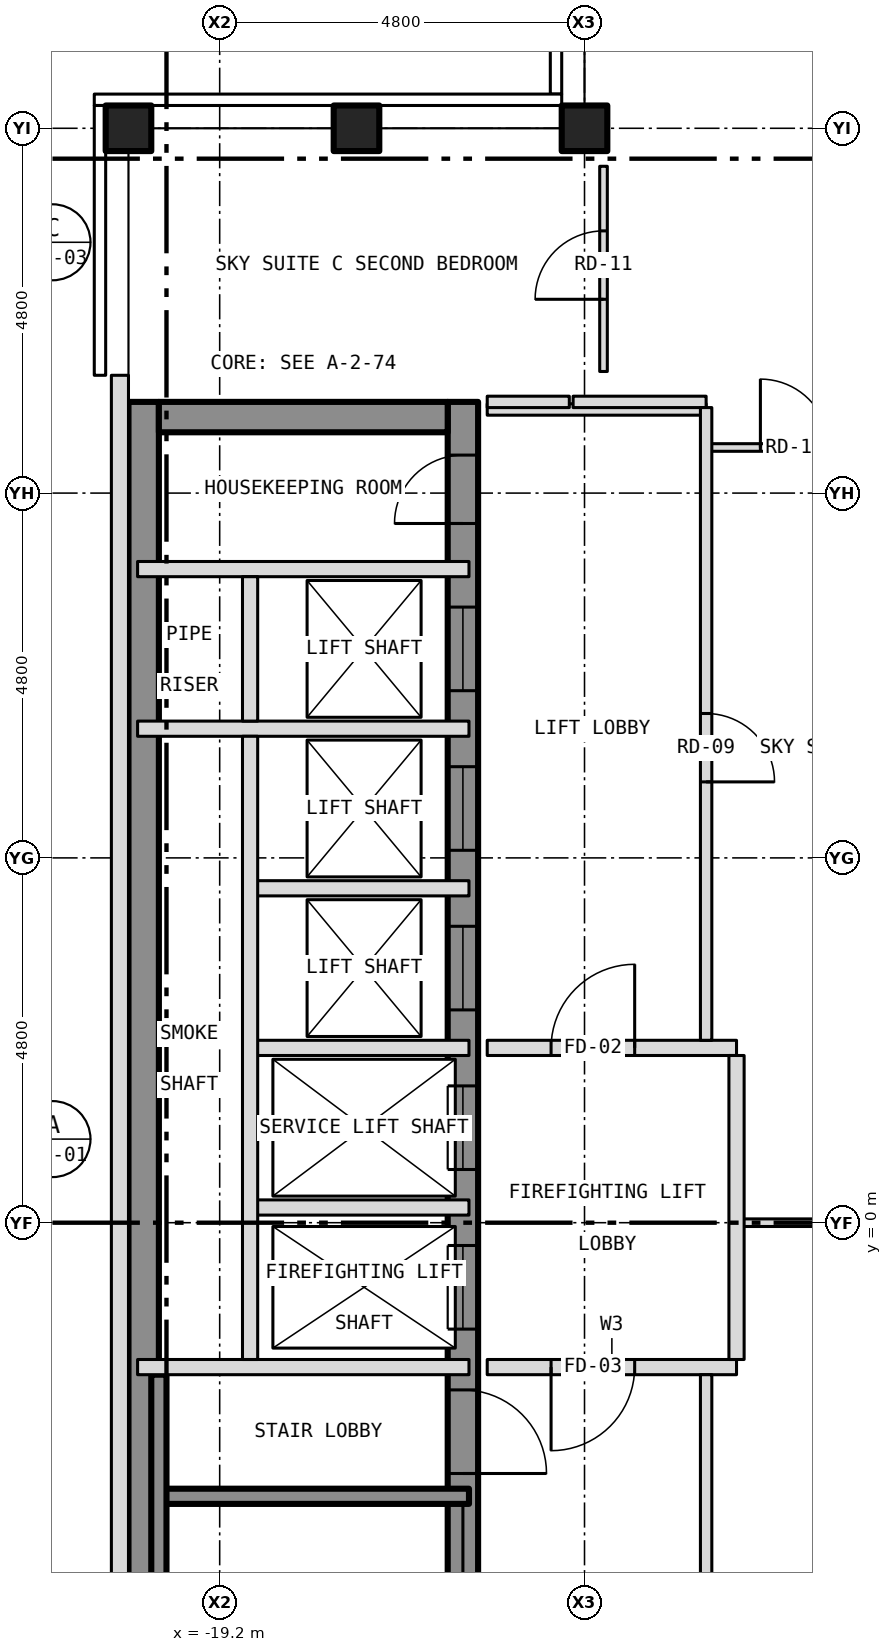
"""IFC4 building model, lengths in metres.
Left out: names, types, materials, properties, quantities, classifications, styles, units other than length and angle.
Written with IfcOpenShell. Run it as: python <this file> out.ifc"""

import sys

from ifc_helpers import new_model, si_unit, direction, frame, frame_2d, origin, origin_2d, place, context, subcontext, project, spatial, rectangle, hollow_rectangle, extrude, element, fill, save


model = new_model("IFC4")
c1 = context("Model", 3, precision=1e-05, world=origin(), true_north=direction((0.0, 1.0)))
c2 = subcontext(c1, "Body", "Model", "MODEL_VIEW")
j1 = project(units=[si_unit("LENGTHUNIT", "METRE"), si_unit("PLANEANGLEUNIT", "RADIAN")], contexts=[c1])
p1 = place(None, origin())
s1 = spatial("IfcSite", under=j1, at=p1, CompositionType="ELEMENT")
p2 = place(p1, origin())
s2 = spatial("IfcBuilding", under=s1, at=p2, CompositionType="ELEMENT")
p3 = place(p2, frame((0.0, 0.0, 269.0)))
s3 = spatial("IfcBuildingStorey", under=s2, at=p3, CompositionType="ELEMENT", Elevation=269.0)
for number, where, z_axis, x_axis in (
    (1, (-20.4, 14.4, -0.15), (0.0, 0.0, 1.0), (1.0, 0.0, 0.0)),
    (2, (-14.4, 14.4, -0.15), (0.0, 0.0, 1.0), (1.0, 0.0, 0.0)),
    (3, (-17.4, 14.4, -0.15), (0.0, 0.0, 1.0), (1.0, 0.0, 0.0)),
):
    element("IfcColumn", number, at=place(p3, frame(where, z_axis=z_axis, x_axis=x_axis)), inside=s3, PredefinedType="COLUMN", context=c2, shape_type="SweptSolid", body=[
        extrude(hollow_rectangle(XDim=0.6, YDim=0.6, WallThickness=0.03, at=origin_2d()), origin(), (0.0, 0.0, 1.0), 3.5),
    ])
p4 = place(p3, frame((-16.0, -10.8, 0.0), z_axis=(0.0, 0.0, 1.0), x_axis=(0.0, 1.0, 0.0)))
e4 = element("IfcWall", 4, at=p4, inside=s3, PredefinedType="SHEAR", context=c2, shape_type="SweptSolid", body=[
    extrude(rectangle(XDim=21.6, YDim=0.4, at=frame_2d((10.8, 0.0))), origin(), (0.0, 0.0, 1.0), 3.25),
])
p5 = place(p4, frame((9.4, 0.0, 0.0)))
e5 = element("IfcOpeningElement", 5, at=p5, cuts=e4, PredefinedType="OPENING", context=c2, shape_type="SweptSolid", body=[
    extrude(rectangle(XDim=1.1, YDim=2.1, at=frame_2d((0.55, 1.05))), frame((0.0, 0.212, 0.0), z_axis=(0.0, -1.0, 0.0), x_axis=(1.0, 0.0, 0.0)), (0.0, 0.0, 1.0), 0.424),
])
p6 = place(p4, frame((11.5, 0.0, 0.0)))
e6 = element("IfcOpeningElement", 6, at=p6, cuts=e4, PredefinedType="OPENING", context=c2, shape_type="SweptSolid", body=[
    extrude(rectangle(XDim=1.1, YDim=2.1, at=frame_2d((0.55, 1.05))), frame((0.0, 0.212, 0.0), z_axis=(0.0, -1.0, 0.0), x_axis=(1.0, 0.0, 0.0)), (0.0, 0.0, 1.0), 0.424),
])
p7 = place(p4, frame((13.6, 0.0, 0.0)))
e7 = element("IfcOpeningElement", 7, at=p7, cuts=e4, PredefinedType="OPENING", context=c2, shape_type="SweptSolid", body=[
    extrude(rectangle(XDim=1.1, YDim=2.1, at=frame_2d((0.55, 1.05))), frame((0.0, 0.212, 0.0), z_axis=(0.0, -1.0, 0.0), x_axis=(1.0, 0.0, 0.0)), (0.0, 0.0, 1.0), 0.424),
])
p8 = place(p4, frame((15.7, 0.0, 0.0)))
e8 = element("IfcOpeningElement", 8, at=p8, cuts=e4, PredefinedType="OPENING", context=c2, shape_type="SweptSolid", body=[
    extrude(rectangle(XDim=1.1, YDim=2.1, at=frame_2d((0.55, 1.05))), frame((0.0, 0.212, 0.0), z_axis=(0.0, -1.0, 0.0), x_axis=(1.0, 0.0, 0.0)), (0.0, 0.0, 1.0), 0.424),
])
p9 = place(p4, frame((17.8, 0.0, 0.0)))
e9 = element("IfcOpeningElement", 9, at=p9, cuts=e4, PredefinedType="OPENING", context=c2, shape_type="SweptSolid", body=[
    extrude(rectangle(XDim=1.1, YDim=2.1, at=frame_2d((0.55, 1.05))), frame((0.0, 0.212, 0.0), z_axis=(0.0, -1.0, 0.0), x_axis=(1.0, 0.0, 0.0)), (0.0, 0.0, 1.0), 0.424),
])
p10 = place(p4, frame((0.458, 0.0, 0.0)))
e10 = element("IfcOpeningElement", 10, at=p10, cuts=e4, PredefinedType="OPENING", context=c2, shape_type="SweptSolid", body=[
    extrude(rectangle(XDim=1.1, YDim=2.1, at=frame_2d((0.55, 1.05))), frame((0.0, 0.212, 0.0), z_axis=(0.0, -1.0, 0.0), x_axis=(1.0, 0.0, 0.0)), (0.0, 0.0, 1.0), 0.424),
])
p11 = place(p4, frame((7.5, 0.0, 0.0)))
e11 = element("IfcOpeningElement", 11, at=p11, cuts=e4, PredefinedType="OPENING", context=c2, shape_type="SweptSolid", body=[
    extrude(rectangle(XDim=1.1, YDim=2.1, at=frame_2d((0.55, 1.05))), frame((0.0, 0.212, 0.0), z_axis=(0.0, -1.0, 0.0), x_axis=(1.0, 0.0, 0.0)), (0.0, 0.0, 1.0), 0.424),
])
p12 = place(p4, frame((20.0, 0.0, 0.0)))
e12 = element("IfcOpeningElement", 12, at=p12, cuts=e4, PredefinedType="OPENING", context=c2, shape_type="SweptSolid", body=[
    extrude(rectangle(XDim=0.9, YDim=2.1, at=frame_2d((0.45, 1.05))), frame((0.0, 0.212, 0.0), z_axis=(0.0, -1.0, 0.0), x_axis=(1.0, 0.0, 0.0)), (0.0, 0.0, 1.0), 0.424),
])
p13 = place(p3, frame((-20.2, -10.8, 0.0), z_axis=(0.0, 0.0, 1.0), x_axis=(0.0, 1.0, 0.0)))
e13 = element("IfcWall", 13, at=p13, inside=s3, PredefinedType="SHEAR", context=c2, shape_type="SweptSolid", body=[
    extrude(rectangle(XDim=21.6, YDim=0.4, at=frame_2d((10.8, 0.0))), origin(), (0.0, 0.0, 1.0), 3.25),
])
p14 = place(p3, frame((-20.0, 10.6, 0.0), z_axis=(0.0, 0.0, 1.0), x_axis=(1.0, 0.0, 0.0)))
e14 = element("IfcWall", 14, at=p14, inside=s3, PredefinedType="SHEAR", context=c2, shape_type="SweptSolid", body=[
    extrude(rectangle(XDim=3.8, YDim=0.4, at=frame_2d((1.9, 0.0))), origin(), (0.0, 0.0, 1.0), 3.25),
])
p15 = place(p3, frame((-20.512, 11.15, 0.0), z_axis=(0.0, 0.0, 1.0), x_axis=(0.0, -1.0, 0.0)))
e15 = element("IfcWall", 15, at=p15, inside=s3, PredefinedType="SOLIDWALL", context=c2, shape_type="SweptSolid", body=[
    extrude(rectangle(XDim=22.3, YDim=0.225, at=frame_2d((11.15, 0.0))), origin(), (0.0, 0.0, 1.0), 3.5),
])
p16 = place(p15, frame((18.4, 0.0, 1.0)))
e16 = element("IfcOpeningElement", 16, at=p16, cuts=e15, PredefinedType="OPENING", context=c2, shape_type="SweptSolid", body=[
    extrude(rectangle(XDim=0.6, YDim=1.5, at=frame_2d((0.3, 0.75))), frame((0.0, 0.125, 0.0), z_axis=(0.0, -1.0, 0.0), x_axis=(1.0, 0.0, 0.0)), (0.0, 0.0, 1.0), 0.249),
])
p17 = place(p3, frame((-20.0, -3.6, 0.0), z_axis=(0.0, 0.0, 1.0), x_axis=(1.0, 0.0, 0.0)))
e17 = element("IfcWall", 17, at=p17, inside=s3, PredefinedType="SHEAR", context=c2, shape_type="SweptSolid", body=[
    extrude(rectangle(XDim=4.08, YDim=0.2, at=frame_2d((2.04, 0.0))), origin(), (0.0, 0.0, 1.0), 3.25),
])
p18 = place(p3, frame((-20.28, -1.9, 0.0), z_axis=(0.0, 0.0, 1.0), x_axis=(1.0, 0.0, 0.0)))
e18 = element("IfcWall", 18, at=p18, inside=s3, PredefinedType="PARTITIONING", context=c2, shape_type="SweptSolid", body=[
    extrude(rectangle(XDim=4.36, YDim=0.2, at=frame_2d((2.18, 0.0))), origin(), (0.0, 0.0, 1.0), 3.25),
])
p19 = place(p3, frame((-15.68, -1.9, 0.0), z_axis=(0.0, 0.0, 1.0), x_axis=(1.0, 0.0, 0.0)))
e19 = element("IfcWall", 19, at=p19, inside=s3, PredefinedType="PARTITIONING", context=c2, shape_type="SweptSolid", body=[
    extrude(rectangle(XDim=3.28, YDim=0.2, at=frame_2d((1.64, 0.0))), origin(), (0.0, 0.0, 1.0), 3.35),
])
p20 = place(p19, frame((0.84, 0.0, 0.0)))
e20 = element("IfcOpeningElement", 20, at=p20, cuts=e19, PredefinedType="OPENING", context=c2, shape_type="SweptSolid", body=[
    extrude(rectangle(XDim=1.1, YDim=2.1, at=frame_2d((0.55, 1.05))), frame((0.0, 0.112, 0.0), z_axis=(0.0, -1.0, 0.0), x_axis=(1.0, 0.0, 0.0)), (0.0, 0.0, 1.0), 0.224),
])
p21 = place(p3, frame((-12.4, 0.0, 0.0), z_axis=(0.0, 0.0, 1.0), x_axis=(1.0, 0.0, 0.0)))
e21 = element("IfcWall", 21, at=p21, inside=s3, PredefinedType="PARTITIONING", context=c2, shape_type="SweptSolid", body=[
    extrude(rectangle(XDim=2.616, YDim=0.1, at=frame_2d((1.308, 0.0))), origin(), (0.0, 0.0, 1.0), 2.728),
])
for number, where, z_axis, x_axis in (
    (22, (-18.8, 0.2, 0.0), (0.0, 0.0, 1.0), (1.0, 0.0, 0.0)),
    (23, (-18.8, 2.3, 0.0), (0.0, 0.0, 1.0), (1.0, 0.0, 0.0)),
):
    element("IfcWall", number, at=place(p3, frame(where, z_axis=z_axis, x_axis=x_axis)), inside=s3, PredefinedType="PARTITIONING", context=c2, shape_type="SweptSolid", body=[
        extrude(rectangle(XDim=2.88, YDim=0.2, at=frame_2d((1.44, 0.0))), origin(), (0.0, 0.0, 1.0), 3.25),
    ])
p22 = place(p3, frame((-15.68, 2.3, 0.0), z_axis=(0.0, 0.0, 1.0), x_axis=(1.0, 0.0, 0.0)))
e24 = element("IfcWall", 24, at=p22, inside=s3, PredefinedType="PARTITIONING", context=c2, shape_type="SweptSolid", body=[
    extrude(rectangle(XDim=3.28, YDim=0.2, at=frame_2d((1.64, 0.0))), origin(), (0.0, 0.0, 1.0), 3.35),
])
p23 = place(p22, frame((0.84, 0.0, 0.0)))
e25 = element("IfcOpeningElement", 25, at=p23, cuts=e24, PredefinedType="OPENING", context=c2, shape_type="SweptSolid", body=[
    extrude(rectangle(XDim=1.1, YDim=2.1, at=frame_2d((0.55, 1.05))), frame((0.0, 0.112, 0.0), z_axis=(0.0, -1.0, 0.0), x_axis=(1.0, 0.0, 0.0)), (0.0, 0.0, 1.0), 0.224),
])
p24 = place(p3, frame((-18.8, 4.4, 0.0), z_axis=(0.0, 0.0, 1.0), x_axis=(1.0, 0.0, 0.0)))
e26 = element("IfcWall", 26, at=p24, inside=s3, PredefinedType="PARTITIONING", context=c2, shape_type="SweptSolid", body=[
    extrude(rectangle(XDim=2.88, YDim=0.2, at=frame_2d((1.44, 0.0))), origin(), (0.0, 0.0, 1.0), 3.25),
])
for number, where, z_axis, x_axis in (
    (27, (-20.28, 6.5, 0.0), (0.0, 0.0, 1.0), (1.0, 0.0, 0.0)),
    (28, (-20.28, 8.6, 0.0), (0.0, 0.0, 1.0), (1.0, 0.0, 0.0)),
):
    element("IfcWall", number, at=place(p3, frame(where, z_axis=z_axis, x_axis=x_axis)), inside=s3, PredefinedType="PARTITIONING", context=c2, shape_type="SweptSolid", body=[
        extrude(rectangle(XDim=4.36, YDim=0.2, at=frame_2d((2.18, 0.0))), origin(), (0.0, 0.0, 1.0), 3.25),
    ])
p25 = place(p3, frame((-12.8, 10.2, 0.0), z_axis=(0.0, 0.0, 1.0), x_axis=(1.0, 0.0, 0.0)))
e29 = element("IfcWall", 29, at=p25, inside=s3, PredefinedType="PARTITIONING", context=c2, shape_type="SweptSolid", body=[
    extrude(rectangle(XDim=5.258, YDim=0.1, at=frame_2d((2.629, 0.0))), origin(), (0.0, 0.0, 1.0), 3.35),
])
p26 = place(p25, frame((0.714, 0.0, 0.0)))
e30 = element("IfcOpeningElement", 30, at=p26, cuts=e29, PredefinedType="OPENING", context=c2, shape_type="SweptSolid", body=[
    extrude(rectangle(XDim=0.9, YDim=2.1, at=frame_2d((0.45, 1.05))), frame((0.0, 0.062, 0.0), z_axis=(0.0, -1.0, 0.0), x_axis=(1.0, 0.0, 0.0)), (0.0, 0.0, 1.0), 0.124),
])
p27 = place(p3, frame((-15.68, 10.7, 0.0), z_axis=(0.0, 0.0, 1.0), x_axis=(1.0, 0.0, 0.0)))
e31 = element("IfcWall", 31, at=p27, inside=s3, PredefinedType="PARTITIONING", context=c2, shape_type="SweptSolid", body=[
    extrude(rectangle(XDim=2.88, YDim=0.15, at=frame_2d((1.44, 0.0))), origin(), (0.0, 0.0, 1.0), 3.35),
])
p28 = place(p3, frame((-15.68, 10.8, 0.0), z_axis=(0.0, 0.0, 1.0), x_axis=(1.0, 0.0, 0.0)))
e32 = element("IfcWall", 32, at=p28, inside=s3, PredefinedType="PARTITIONING", context=c2, shape_type="SweptSolid", body=[
    extrude(rectangle(XDim=1.08, YDim=0.15, at=frame_2d((0.54, 0.0))), origin(), (0.0, 0.0, 1.0), 3.35),
])
p29 = place(p3, frame((-14.55, 10.8, 0.0), z_axis=(0.0, 0.0, 1.0), x_axis=(1.0, 0.0, 0.0)))
e33 = element("IfcWall", 33, at=p29, inside=s3, PredefinedType="PARTITIONING", context=c2, shape_type="SweptSolid", body=[
    extrude(rectangle(XDim=1.75, YDim=0.15, at=frame_2d((0.875, 0.0))), origin(), (0.0, 0.0, 1.0), 3.35),
])
p30 = place(p3, frame((-20.0, -10.68, 0.0), z_axis=(0.0, 0.0, 1.0), x_axis=(0.0, 1.0, 0.0)))
e34 = element("IfcWall", 34, at=p30, inside=s3, PredefinedType="SHEAR", context=c2, shape_type="SweptSolid", body=[
    extrude(rectangle(XDim=8.68, YDim=0.2, at=frame_2d((4.34, 0.0))), origin(), (0.0, 0.0, 1.0), 3.25),
])
p31 = place(p3, frame((-18.8, -1.8, 0.0), z_axis=(0.0, 0.0, 1.0), x_axis=(0.0, 1.0, 0.0)))
e35 = element("IfcWall", 35, at=p31, inside=s3, PredefinedType="PARTITIONING", context=c2, shape_type="SweptSolid", body=[
    extrude(rectangle(XDim=8.2, YDim=0.2, at=frame_2d((4.1, 0.0))), origin(), (0.0, 0.0, 1.0), 3.25),
])
p32 = place(p3, frame((-18.8, 6.6, 0.0), z_axis=(0.0, 0.0, 1.0), x_axis=(0.0, 1.0, 0.0)))
e36 = element("IfcWall", 36, at=p32, inside=s3, PredefinedType="PARTITIONING", context=c2, shape_type="SweptSolid", body=[
    extrude(rectangle(XDim=1.9, YDim=0.2, at=frame_2d((0.95, 0.0))), origin(), (0.0, 0.0, 1.0), 3.25),
])
p33 = place(p3, frame((-14.15, 11.2, 0.0), z_axis=(0.0, 0.0, 1.0), x_axis=(0.0, 1.0, 0.0)))
e37 = element("IfcWall", 37, at=p33, inside=s3, PredefinedType="PARTITIONING", context=c2, shape_type="SweptSolid", body=[
    extrude(rectangle(XDim=2.7, YDim=0.1, at=frame_2d((1.35, 0.0))), origin(), (0.0, 0.0, 1.0), 3.35),
])
p34 = place(p33, frame((0.95, 0.0, 0.0)))
e38 = element("IfcOpeningElement", 38, at=p34, cuts=e37, PredefinedType="OPENING", context=c2, shape_type="SweptSolid", body=[
    extrude(rectangle(XDim=0.9, YDim=2.1, at=frame_2d((0.45, 1.05))), frame((0.0, 0.062, 0.0), z_axis=(0.0, -1.0, 0.0), x_axis=(1.0, 0.0, 0.0)), (0.0, 0.0, 1.0), 0.124),
])
p35 = place(p3, frame((-12.8, -10.725, 0.0), z_axis=(0.0, 0.0, 1.0), x_axis=(0.0, 1.0, 0.0)))
e39 = element("IfcWall", 39, at=p35, inside=s3, PredefinedType="PARTITIONING", context=c2, shape_type="SweptSolid", body=[
    extrude(rectangle(XDim=8.725, YDim=0.15, at=frame_2d((4.363, 0.0))), origin(), (0.0, 0.0, 1.0), 3.35),
])
p36 = place(p35, frame((4.735, 0.0, 0.0)))
e40 = element("IfcOpeningElement", 40, at=p36, cuts=e39, PredefinedType="OPENING", context=c2, shape_type="SweptSolid", body=[
    extrude(rectangle(XDim=0.9, YDim=2.1, at=frame_2d((0.45, 1.05))), frame((0.0, 0.087, 0.0), z_axis=(0.0, -1.0, 0.0), x_axis=(1.0, 0.0, 0.0)), (0.0, 0.0, 1.0), 0.174),
])
p37 = place(p3, frame((-12.8, 2.4, 0.0), z_axis=(0.0, 0.0, 1.0), x_axis=(0.0, 1.0, 0.0)))
e41 = element("IfcWall", 41, at=p37, inside=s3, PredefinedType="PARTITIONING", context=c2, shape_type="SweptSolid", body=[
    extrude(rectangle(XDim=8.325, YDim=0.15, at=frame_2d((4.163, 0.0))), origin(), (0.0, 0.0, 1.0), 3.35),
])
p38 = place(p37, frame((3.4, 0.0, 0.0)))
e42 = element("IfcOpeningElement", 42, at=p38, cuts=e41, PredefinedType="OPENING", context=c2, shape_type="SweptSolid", body=[
    extrude(rectangle(XDim=0.9, YDim=2.1, at=frame_2d((0.45, 1.05))), frame((0.0, 0.087, 0.0), z_axis=(0.0, -1.0, 0.0), x_axis=(1.0, 0.0, 0.0)), (0.0, 0.0, 1.0), 0.174),
])
p39 = place(p3, frame((-12.4, -1.8, 0.0), z_axis=(0.0, 0.0, 1.0), x_axis=(0.0, 1.0, 0.0)))
e43 = element("IfcWall", 43, at=p39, inside=s3, PredefinedType="PARTITIONING", context=c2, shape_type="SweptSolid", body=[
    extrude(rectangle(XDim=4.0, YDim=0.2, at=frame_2d((2.0, 0.0))), origin(), (0.0, 0.0, 1.0), 3.35),
])
p40 = place(p5, origin())
e44 = element("IfcDoor", 44, at=p40, inside=s3, OperationType="SLIDING_TO_LEFT", PredefinedType="DOOR", context=c2, shape_type="SweptSolid", body=[
    extrude(rectangle(XDim=1.1, YDim=2.1, at=frame_2d((0.55, 1.05))), frame((0.0, 0.025, 0.0), z_axis=(0.0, -1.0, 0.0), x_axis=(1.0, 0.0, 0.0)), (0.0, 0.0, 1.0), 0.05),
])
fill(e5, e44)
p41 = place(p6, origin())
e45 = element("IfcDoor", 45, at=p41, inside=s3, OperationType="SLIDING_TO_LEFT", PredefinedType="DOOR", context=c2, shape_type="SweptSolid", body=[
    extrude(rectangle(XDim=1.1, YDim=2.1, at=frame_2d((0.55, 1.05))), frame((0.0, 0.025, 0.0), z_axis=(0.0, -1.0, 0.0), x_axis=(1.0, 0.0, 0.0)), (0.0, 0.0, 1.0), 0.05),
])
fill(e6, e45)
p42 = place(p7, origin())
e46 = element("IfcDoor", 46, at=p42, inside=s3, OperationType="SLIDING_TO_LEFT", PredefinedType="DOOR", context=c2, shape_type="SweptSolid", body=[
    extrude(rectangle(XDim=1.1, YDim=2.1, at=frame_2d((0.55, 1.05))), frame((0.0, 0.025, 0.0), z_axis=(0.0, -1.0, 0.0), x_axis=(1.0, 0.0, 0.0)), (0.0, 0.0, 1.0), 0.05),
])
fill(e7, e46)
p43 = place(p8, origin())
e47 = element("IfcDoor", 47, at=p43, inside=s3, OperationType="SLIDING_TO_LEFT", PredefinedType="DOOR", context=c2, shape_type="SweptSolid", body=[
    extrude(rectangle(XDim=1.1, YDim=2.1, at=frame_2d((0.55, 1.05))), frame((0.0, 0.025, 0.0), z_axis=(0.0, -1.0, 0.0), x_axis=(1.0, 0.0, 0.0)), (0.0, 0.0, 1.0), 0.05),
])
fill(e8, e47)
p44 = place(p9, origin())
e48 = element("IfcDoor", 48, at=p44, inside=s3, OperationType="SLIDING_TO_LEFT", PredefinedType="DOOR", context=c2, shape_type="SweptSolid", body=[
    extrude(rectangle(XDim=1.1, YDim=2.1, at=frame_2d((0.55, 1.05))), frame((0.0, 0.025, 0.0), z_axis=(0.0, -1.0, 0.0), x_axis=(1.0, 0.0, 0.0)), (0.0, 0.0, 1.0), 0.05),
])
fill(e9, e48)
p45 = place(p11, origin())
e49 = element("IfcDoor", 49, at=p45, inside=s3, OperationType="SINGLE_SWING_LEFT", PredefinedType="DOOR", context=c2, shape_type="SweptSolid", body=[
    extrude(rectangle(XDim=1.1, YDim=2.1, at=frame_2d((0.55, 1.05))), frame((0.0, 0.025, 0.0), z_axis=(0.0, -1.0, 0.0), x_axis=(1.0, 0.0, 0.0)), (0.0, 0.0, 1.0), 0.05),
])
fill(e11, e49)
p46 = place(p12, origin())
e50 = element("IfcDoor", 50, at=p46, inside=s3, OperationType="SINGLE_SWING_LEFT", PredefinedType="DOOR", context=c2, shape_type="SweptSolid", body=[
    extrude(rectangle(XDim=0.9, YDim=2.1, at=frame_2d((0.45, 1.05))), frame((0.0, 0.025, 0.0), z_axis=(0.0, -1.0, 0.0), x_axis=(1.0, 0.0, 0.0)), (0.0, 0.0, 1.0), 0.05),
])
fill(e12, e50)
p47 = place(p23, origin())
e51 = element("IfcDoor", 51, at=p47, inside=s3, OperationType="SINGLE_SWING_RIGHT", PredefinedType="DOOR", context=c2, shape_type="SweptSolid", body=[
    extrude(rectangle(XDim=1.1, YDim=2.1, at=frame_2d((0.55, 1.05))), frame((0.0, 0.025, 0.0), z_axis=(0.0, -1.0, 0.0), x_axis=(1.0, 0.0, 0.0)), (0.0, 0.0, 1.0), 0.05),
])
fill(e25, e51)
p48 = place(p20, origin())
e52 = element("IfcDoor", 52, at=p48, inside=s3, OperationType="SINGLE_SWING_LEFT", PredefinedType="DOOR", context=c2, shape_type="SweptSolid", body=[
    extrude(rectangle(XDim=1.1, YDim=2.1, at=frame_2d((0.55, 1.05))), frame((0.0, 0.025, 0.0), z_axis=(0.0, -1.0, 0.0), x_axis=(1.0, 0.0, 0.0)), (0.0, 0.0, 1.0), 0.05),
])
fill(e20, e52)
p49 = place(p38, origin())
e53 = element("IfcDoor", 53, at=p49, inside=s3, OperationType="SINGLE_SWING_LEFT", PredefinedType="DOOR", context=c2, shape_type="SweptSolid", body=[
    extrude(rectangle(XDim=0.9, YDim=2.1, at=frame_2d((0.45, 1.05))), frame((0.0, 0.025, 0.0), z_axis=(0.0, -1.0, 0.0), x_axis=(1.0, 0.0, 0.0)), (0.0, 0.0, 1.0), 0.05),
])
fill(e42, e53)
p50 = place(p26, origin())
e54 = element("IfcDoor", 54, at=p50, inside=s3, OperationType="SINGLE_SWING_LEFT", PredefinedType="DOOR", context=c2, shape_type="SweptSolid", body=[
    extrude(rectangle(XDim=0.9, YDim=2.1, at=frame_2d((0.45, 1.05))), frame((0.0, 0.025, 0.0), z_axis=(0.0, -1.0, 0.0), x_axis=(1.0, 0.0, 0.0)), (0.0, 0.0, 1.0), 0.05),
])
fill(e30, e54)
p51 = place(p34, origin())
e55 = element("IfcDoor", 55, at=p51, inside=s3, OperationType="SINGLE_SWING_LEFT", PredefinedType="DOOR", context=c2, shape_type="SweptSolid", body=[
    extrude(rectangle(XDim=0.9, YDim=2.1, at=frame_2d((0.45, 1.05))), frame((0.0, 0.025, 0.0), z_axis=(0.0, -1.0, 0.0), x_axis=(1.0, 0.0, 0.0)), (0.0, 0.0, 1.0), 0.05),
])
fill(e38, e55)
save(model, sys.argv[1])
